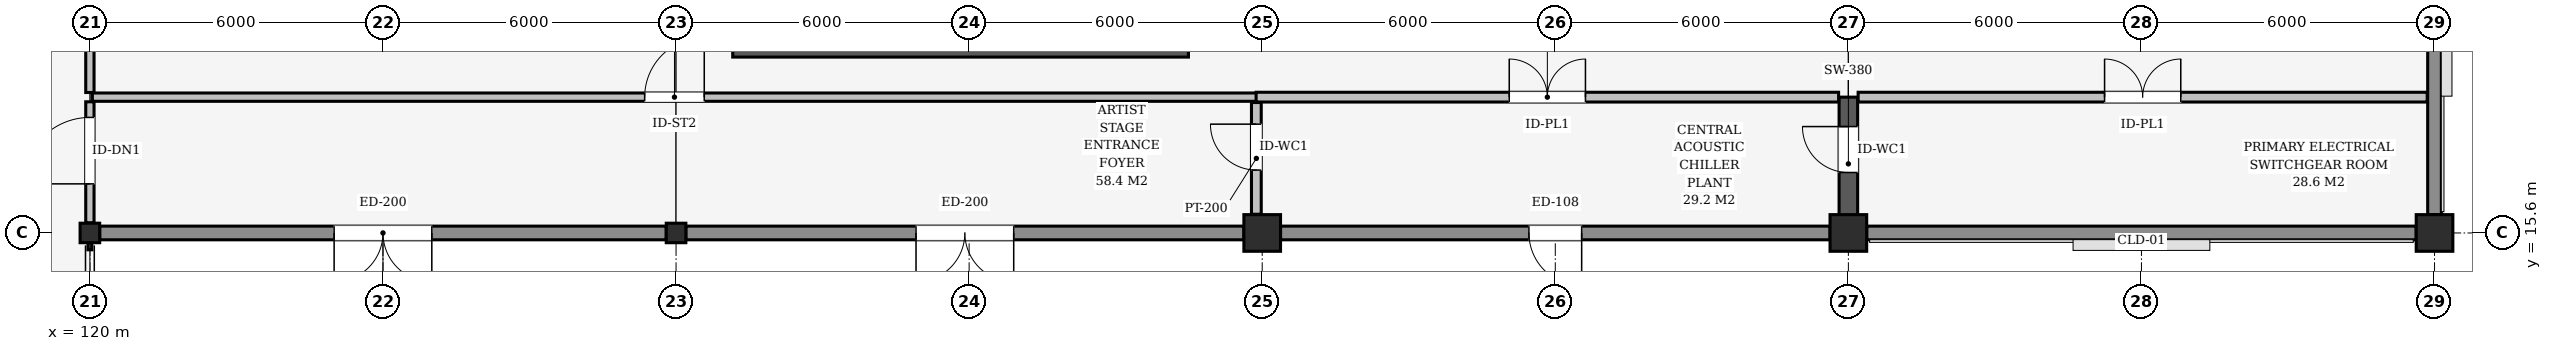
"""IFC4 building model, lengths in metres.
Left out: names, types, materials, properties, quantities, classifications, styles, units other than length and angle.
Written with IfcOpenShell. Run it as: python <this file> out.ifc"""

import sys

from ifc_helpers import new_model, si_unit, direction, frame, frame_2d, origin, origin_2d, place, context, subcontext, project, spatial, rectangle, i_section, extrude, element, fill, save


model = new_model("IFC4")
c1 = context("Model", 3, precision=1e-05, world=origin(), true_north=direction((0.0, 1.0)))
c2 = subcontext(c1, "Body", "Model", "MODEL_VIEW")
j1 = project(units=[si_unit("LENGTHUNIT", "METRE"), si_unit("PLANEANGLEUNIT", "RADIAN")], contexts=[c1])
p1 = place(None, origin())
s1 = spatial("IfcSite", under=j1, at=p1, CompositionType="ELEMENT")
p2 = place(p1, origin())
s2 = spatial("IfcBuilding", under=s1, at=p2, CompositionType="ELEMENT")
p3 = place(p2, origin())
s3 = spatial("IfcBuildingStorey", under=s2, at=p3, CompositionType="ELEMENT", Elevation=0.0)
for number, where, z_axis, x_axis in (
    (1, (120.0, 15.6, 0.0), (0.0, 0.0, 1.0), (1.0, 0.0, 0.0)),
    (2, (132.0, 15.6, 0.0), (0.0, 0.0, 1.0), (1.0, 0.0, 0.0)),
):
    element("IfcColumn", number, at=place(p3, frame(where, z_axis=z_axis, x_axis=x_axis)), inside=s3, PredefinedType="COLUMN", context=c2, shape_type="SweptSolid", body=[
        extrude(i_section(OverallWidth=0.401, OverallDepth=0.399, WebThickness=0.025, FlangeThickness=0.04, at=origin_2d()), origin(), (0.0, 0.0, 1.0), 4.8),
    ])
for number, where, z_axis, x_axis in (
    (3, (144.0, 15.6, 0.0), (0.0, 0.0, 1.0), (1.0, 0.0, 0.0)),
    (4, (156.0, 15.6, 0.0), (0.0, 0.0, 1.0), (1.0, 0.0, 0.0)),
    (5, (168.0, 15.6, 0.0), (0.0, 0.0, 1.0), (1.0, 0.0, 0.0)),
):
    element("IfcColumn", number, at=place(p3, frame(where, z_axis=z_axis, x_axis=x_axis)), inside=s3, PredefinedType="COLUMN", context=c2, shape_type="SweptSolid", body=[
        extrude(rectangle(XDim=0.75, YDim=0.75, at=origin_2d()), origin(), (0.0, 0.0, 1.0), 4.8),
    ])
p4 = place(p3, frame((156.0, 15.65, 0.0), z_axis=(0.0, 0.0, 1.0), x_axis=(0.0, 1.0, 0.0)))
e6 = element("IfcWall", 6, at=p4, inside=s3, PredefinedType="SHEAR", context=c2, shape_type="SweptSolid", body=[
    extrude(rectangle(XDim=2.73, YDim=0.38, at=frame_2d((1.365, 0.0))), origin(), (0.0, 0.0, 1.0), 3.63),
])
p5 = place(p4, frame((1.188, 0.0, 0.0)))
e7 = element("IfcOpeningElement", 7, at=p5, cuts=e6, PredefinedType="OPENING", context=c2, shape_type="SweptSolid", body=[
    extrude(rectangle(XDim=0.94, YDim=2.1, at=frame_2d((0.47, 1.05))), frame((0.0, 0.2, 0.0), z_axis=(0.0, -1.0, 0.0), x_axis=(1.0, 0.0, 0.0)), (0.0, 0.0, 1.0), 0.4),
])
p6 = place(p3, frame((131.8, 15.6, 0.0), z_axis=(0.0, 0.0, 1.0), x_axis=(-1.0, 0.0, 0.0)))
e8 = element("IfcWall", 8, at=p6, inside=s3, PredefinedType="SOLIDWALL", context=c2, shape_type="SweptSolid", body=[
    extrude(rectangle(XDim=11.599, YDim=0.28, at=frame_2d((5.8, 0.0))), origin(), (0.0, 0.0, 1.0), 3.767),
])
p7 = place(p6, frame((4.8, 0.0, 0.0)))
e9 = element("IfcOpeningElement", 9, at=p7, cuts=e8, PredefinedType="OPENING", context=c2, shape_type="SweptSolid", body=[
    extrude(rectangle(XDim=2.0, YDim=2.4, at=frame_2d((1.0, 1.2))), frame((0.0, 0.15, 0.0), z_axis=(0.0, -1.0, 0.0), x_axis=(1.0, 0.0, 0.0)), (0.0, 0.0, 1.0), 0.3),
])
p8 = place(p3, frame((143.625, 15.6, 0.0), z_axis=(0.0, 0.0, 1.0), x_axis=(-1.0, 0.0, 0.0)))
e10 = element("IfcWall", 10, at=p8, inside=s3, PredefinedType="SOLIDWALL", context=c2, shape_type="SweptSolid", body=[
    extrude(rectangle(XDim=11.425, YDim=0.28, at=frame_2d((5.712, 0.0))), origin(), (0.0, 0.0, 1.0), 3.747),
])
p9 = place(p8, frame((4.712, 0.0, 0.0)))
e11 = element("IfcOpeningElement", 11, at=p9, cuts=e10, PredefinedType="OPENING", context=c2, shape_type="SweptSolid", body=[
    extrude(rectangle(XDim=2.0, YDim=2.4, at=frame_2d((1.0, 1.2))), frame((0.0, 0.15, 0.0), z_axis=(0.0, -1.0, 0.0), x_axis=(1.0, 0.0, 0.0)), (0.0, 0.0, 1.0), 0.3),
])
p10 = place(p3, frame((155.625, 15.6, 0.0), z_axis=(0.0, 0.0, 1.0), x_axis=(-1.0, 0.0, 0.0)))
e12 = element("IfcWall", 12, at=p10, inside=s3, PredefinedType="SOLIDWALL", context=c2, shape_type="SweptSolid", body=[
    extrude(rectangle(XDim=11.25, YDim=0.28, at=frame_2d((5.625, 0.0))), origin(), (0.0, 0.0, 1.0), 3.747),
])
p11 = place(p10, frame((5.085, 0.0, 0.0)))
e13 = element("IfcOpeningElement", 13, at=p11, cuts=e12, PredefinedType="OPENING", context=c2, shape_type="SweptSolid", body=[
    extrude(rectangle(XDim=1.08, YDim=2.2, at=frame_2d((0.54, 1.1))), frame((0.0, 0.15, 0.0), z_axis=(0.0, -1.0, 0.0), x_axis=(1.0, 0.0, 0.0)), (0.0, 0.0, 1.0), 0.3),
])
p12 = place(p3, frame((167.625, 15.6, 0.0), z_axis=(0.0, 0.0, 1.0), x_axis=(-1.0, 0.0, 0.0)))
e14 = element("IfcWall", 14, at=p12, inside=s3, PredefinedType="SOLIDWALL", context=c2, shape_type="SweptSolid", body=[
    extrude(rectangle(XDim=11.25, YDim=0.28, at=frame_2d((5.625, 0.0))), origin(), (0.0, 0.0, 1.0), 3.747),
])
p13 = place(p3, frame((168.0, 23.625, 0.0), z_axis=(0.0, 0.0, 1.0), x_axis=(0.0, -1.0, 0.0)))
e15 = element("IfcWall", 15, at=p13, inside=s3, PredefinedType="SOLIDWALL", context=c2, shape_type="SweptSolid", body=[
    extrude(rectangle(XDim=7.65, YDim=0.28, at=frame_2d((3.825, 0.0))), origin(), (0.0, 0.0, 1.0), 3.848),
])
p14 = place(p3, frame((133.16, 19.345, 0.0), z_axis=(0.0, 0.0, 1.0), x_axis=(1.0, 0.0, 0.0)))
e16 = element("IfcWall", 16, at=p14, inside=s3, PredefinedType="SHEAR", context=c2, shape_type="SweptSolid", body=[
    extrude(rectangle(XDim=9.33, YDim=0.29, at=frame_2d((4.665, 0.0))), origin(), (0.0, 0.0, 1.0), 4.48),
])
p15 = place(p3, frame((120.05, 18.38, 0.0), z_axis=(0.0, 0.0, 1.0), x_axis=(1.0, 0.0, 0.0)))
e17 = element("IfcWall", 17, at=p15, inside=s3, PredefinedType="PARTITIONING", context=c2, shape_type="SweptSolid", body=[
    extrude(rectangle(XDim=23.835, YDim=0.17, at=frame_2d((11.917, 0.0))), origin(), (0.0, 0.0, 1.0), 4.46),
])
p16 = place(p15, frame((11.308, 0.0, 0.0)))
e18 = element("IfcOpeningElement", 18, at=p16, cuts=e17, PredefinedType="OPENING", context=c2, shape_type="SweptSolid", body=[
    extrude(rectangle(XDim=1.22, YDim=2.18, at=frame_2d((0.61, 1.09))), frame((0.0, 0.095, 0.0), z_axis=(0.0, -1.0, 0.0), x_axis=(1.0, 0.0, 0.0)), (0.0, 0.0, 1.0), 0.19),
])
p17 = place(p3, frame((143.875, 18.38, 0.0), z_axis=(0.0, 0.0, 1.0), x_axis=(1.0, 0.0, 0.0)))
e19 = element("IfcWall", 19, at=p17, inside=s3, PredefinedType="PARTITIONING", context=c2, shape_type="SweptSolid", body=[
    extrude(rectangle(XDim=11.925, YDim=0.2, at=frame_2d((5.962, 0.0))), origin(), (0.0, 0.0, 1.0), 4.46),
])
p18 = place(p17, frame((5.183, 0.0, 0.0)))
e20 = element("IfcOpeningElement", 20, at=p18, cuts=e19, PredefinedType="OPENING", context=c2, shape_type="SweptSolid", body=[
    extrude(rectangle(XDim=1.56, YDim=2.26, at=frame_2d((0.78, 1.13))), frame((0.0, 0.11, 0.0), z_axis=(0.0, -1.0, 0.0), x_axis=(1.0, 0.0, 0.0)), (0.0, 0.0, 1.0), 0.22),
])
p19 = place(p3, frame((156.2, 18.38, 0.0), z_axis=(0.0, 0.0, 1.0), x_axis=(1.0, 0.0, 0.0)))
e21 = element("IfcWall", 21, at=p19, inside=s3, PredefinedType="PARTITIONING", context=c2, shape_type="SweptSolid", body=[
    extrude(rectangle(XDim=11.65, YDim=0.2, at=frame_2d((5.825, 0.0))), origin(), (0.0, 0.0, 1.0), 4.46),
])
p20 = place(p19, frame((5.045, 0.0, 0.0)))
e22 = element("IfcOpeningElement", 22, at=p20, cuts=e21, PredefinedType="OPENING", context=c2, shape_type="SweptSolid", body=[
    extrude(rectangle(XDim=1.56, YDim=2.26, at=frame_2d((0.78, 1.13))), frame((0.0, 0.11, 0.0), z_axis=(0.0, -1.0, 0.0), x_axis=(1.0, 0.0, 0.0)), (0.0, 0.0, 1.0), 0.22),
])
p21 = place(p3, frame((120.0, 18.475, 0.0), z_axis=(0.0, 0.0, 1.0), x_axis=(0.0, 1.0, 0.0)))
e23 = element("IfcWall", 23, at=p21, inside=s3, PredefinedType="PARTITIONING", context=c2, shape_type="SweptSolid", body=[
    extrude(rectangle(XDim=4.41, YDim=0.17, at=frame_2d((2.205, 0.0))), origin(), (0.0, 0.0, 1.0), 3.848),
])
p22 = place(p21, frame((1.525, 0.0, 0.0)))
e24 = element("IfcOpeningElement", 24, at=p22, cuts=e23, PredefinedType="OPENING", context=c2, shape_type="SweptSolid", body=[
    extrude(rectangle(XDim=1.36, YDim=2.2, at=frame_2d((0.68, 1.1))), frame((0.0, 0.095, 0.0), z_axis=(0.0, -1.0, 0.0), x_axis=(1.0, 0.0, 0.0)), (0.0, 0.0, 1.0), 0.19),
])
p23 = place(p3, frame((143.88, 15.983, 0.0), z_axis=(0.0, 0.0, 1.0), x_axis=(0.0, 1.0, 0.0)))
e25 = element("IfcWall", 25, at=p23, inside=s3, PredefinedType="PARTITIONING", context=c2, shape_type="SweptSolid", body=[
    extrude(rectangle(XDim=2.287, YDim=0.2, at=frame_2d((1.144, 0.0))), origin(), (0.0, 0.0, 1.0), 3.849),
])
p24 = place(p23, frame((0.904, 0.0, 0.0)))
e26 = element("IfcOpeningElement", 26, at=p24, cuts=e25, PredefinedType="OPENING", context=c2, shape_type="SweptSolid", body=[
    extrude(rectangle(XDim=0.94, YDim=2.1, at=frame_2d((0.47, 1.05))), frame((0.0, 0.11, 0.0), z_axis=(0.0, -1.0, 0.0), x_axis=(1.0, 0.0, 0.0)), (0.0, 0.0, 1.0), 0.22),
])
p25 = place(p3, frame((120.0, 15.808, 0.0), z_axis=(0.0, 0.0, 1.0), x_axis=(0.0, 1.0, 0.0)))
e27 = element("IfcWall", 27, at=p25, inside=s3, PredefinedType="PARTITIONING", context=c2, shape_type="SweptSolid", body=[
    extrude(rectangle(XDim=2.477, YDim=0.17, at=frame_2d((1.239, 0.0))), origin(), (0.0, 0.0, 1.0), 3.848),
])
p26 = place(p25, frame((0.798, 0.0, 0.0)))
e28 = element("IfcOpeningElement", 28, at=p26, cuts=e27, PredefinedType="OPENING", context=c2, shape_type="SweptSolid", body=[
    extrude(rectangle(XDim=1.36, YDim=2.2, at=frame_2d((0.68, 1.1))), frame((0.0, 0.095, 0.0), z_axis=(0.0, -1.0, 0.0), x_axis=(1.0, 0.0, 0.0)), (0.0, 0.0, 1.0), 0.19),
])
p27 = place(p7, origin())
e29 = element("IfcDoor", 29, at=p27, inside=s3, OperationType="DOUBLE_DOOR_SINGLE_SWING", PredefinedType="DOOR", context=c2, shape_type="SweptSolid", body=[
    extrude(rectangle(XDim=2.0, YDim=2.4, at=frame_2d((1.0, 1.2))), frame((0.0, 0.025, 0.0), z_axis=(0.0, -1.0, 0.0), x_axis=(1.0, 0.0, 0.0)), (0.0, 0.0, 1.0), 0.05),
])
fill(e9, e29)
p28 = place(p9, origin())
e30 = element("IfcDoor", 30, at=p28, inside=s3, OperationType="DOUBLE_DOOR_SINGLE_SWING", PredefinedType="DOOR", context=c2, shape_type="SweptSolid", body=[
    extrude(rectangle(XDim=2.0, YDim=2.4, at=frame_2d((1.0, 1.2))), frame((0.0, 0.025, 0.0), z_axis=(0.0, -1.0, 0.0), x_axis=(1.0, 0.0, 0.0)), (0.0, 0.0, 1.0), 0.05),
])
fill(e11, e30)
p29 = place(p11, origin())
e31 = element("IfcDoor", 31, at=p29, inside=s3, OperationType="SINGLE_SWING_LEFT", PredefinedType="DOOR", context=c2, shape_type="SweptSolid", body=[
    extrude(rectangle(XDim=1.08, YDim=2.2, at=frame_2d((0.54, 1.1))), frame((0.0, 0.025, 0.0), z_axis=(0.0, -1.0, 0.0), x_axis=(1.0, 0.0, 0.0)), (0.0, 0.0, 1.0), 0.05),
])
fill(e13, e31)
p30 = place(p16, origin())
e32 = element("IfcDoor", 32, at=p30, inside=s3, OperationType="SINGLE_SWING_RIGHT", PredefinedType="DOOR", context=c2, shape_type="SweptSolid", body=[
    extrude(rectangle(XDim=1.22, YDim=2.18, at=frame_2d((0.61, 1.09))), frame((0.0, 0.025, 0.0), z_axis=(0.0, -1.0, 0.0), x_axis=(1.0, 0.0, 0.0)), (0.0, 0.0, 1.0), 0.05),
])
fill(e18, e32)
p31 = place(p18, origin())
e33 = element("IfcDoor", 33, at=p31, inside=s3, OperationType="DOUBLE_DOOR_SINGLE_SWING", PredefinedType="DOOR", context=c2, shape_type="SweptSolid", body=[
    extrude(rectangle(XDim=1.56, YDim=2.26, at=frame_2d((0.78, 1.13))), frame((0.0, 0.025, 0.0), z_axis=(0.0, -1.0, 0.0), x_axis=(1.0, 0.0, 0.0)), (0.0, 0.0, 1.0), 0.05),
])
fill(e20, e33)
p32 = place(p20, origin())
e34 = element("IfcDoor", 34, at=p32, inside=s3, OperationType="DOUBLE_DOOR_SINGLE_SWING", PredefinedType="DOOR", context=c2, shape_type="SweptSolid", body=[
    extrude(rectangle(XDim=1.56, YDim=2.26, at=frame_2d((0.78, 1.13))), frame((0.0, 0.025, 0.0), z_axis=(0.0, -1.0, 0.0), x_axis=(1.0, 0.0, 0.0)), (0.0, 0.0, 1.0), 0.05),
])
fill(e22, e34)
p33 = place(p24, origin())
e35 = element("IfcDoor", 35, at=p33, inside=s3, OperationType="SINGLE_SWING_RIGHT", PredefinedType="DOOR", context=c2, shape_type="SweptSolid", body=[
    extrude(rectangle(XDim=0.94, YDim=2.1, at=frame_2d((0.47, 1.05))), frame((0.0, 0.025, 0.0), z_axis=(0.0, -1.0, 0.0), x_axis=(1.0, 0.0, 0.0)), (0.0, 0.0, 1.0), 0.05),
])
fill(e26, e35)
p34 = place(p26, origin())
e36 = element("IfcDoor", 36, at=p34, inside=s3, OperationType="SINGLE_SWING_LEFT", PredefinedType="DOOR", context=c2, shape_type="SweptSolid", body=[
    extrude(rectangle(XDim=1.36, YDim=2.2, at=frame_2d((0.68, 1.1))), frame((0.0, 0.025, 0.0), z_axis=(0.0, -1.0, 0.0), x_axis=(1.0, 0.0, 0.0)), (0.0, 0.0, 1.0), 0.05),
])
fill(e28, e36)
p35 = place(p5, origin())
e37 = element("IfcDoor", 37, at=p35, inside=s3, OperationType="SINGLE_SWING_RIGHT", PredefinedType="DOOR", context=c2, shape_type="SweptSolid", body=[
    extrude(rectangle(XDim=0.94, YDim=2.1, at=frame_2d((0.47, 1.05))), frame((0.0, 0.025, 0.0), z_axis=(0.0, -1.0, 0.0), x_axis=(1.0, 0.0, 0.0)), (0.0, 0.0, 1.0), 0.05),
])
fill(e7, e37)
save(model, sys.argv[1])
